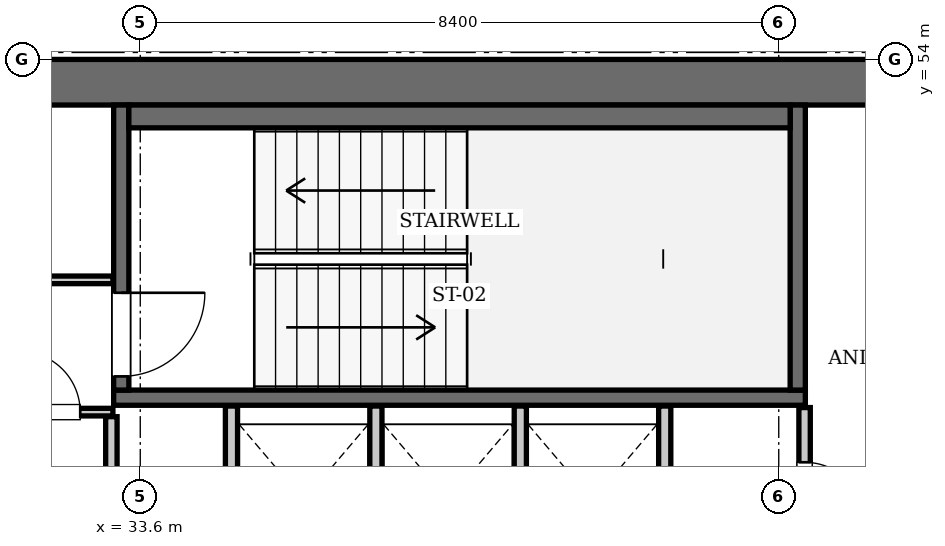
"""IFC4 building model, lengths in metres.
Left out: names, types, materials, properties, quantities, classifications, styles, units other than length and angle.
Written with IfcOpenShell. Run it as: python <this file> out.ifc"""

import sys

from ifc_helpers import new_model, si_unit, direction, frame, frame_2d, origin, place, context, subcontext, project, spatial, rectangle, extrude, element, fill, save


model = new_model("IFC4")
c1 = context("Model", 3, precision=1e-05, world=origin(), true_north=direction((0.0, 1.0)))
c2 = subcontext(c1, "Body", "Model", "MODEL_VIEW")
j1 = project(units=[si_unit("LENGTHUNIT", "METRE"), si_unit("PLANEANGLEUNIT", "RADIAN")], contexts=[c1])
p1 = place(None, origin())
s1 = spatial("IfcSite", under=j1, at=p1, CompositionType="ELEMENT")
p2 = place(p1, origin())
s2 = spatial("IfcBuilding", under=s1, at=p2, CompositionType="ELEMENT")
p3 = place(p2, frame((0.0, 0.0, 325.85)))
s3 = spatial("IfcBuildingStorey", under=s2, at=p3, CompositionType="ELEMENT", Elevation=325.85)
p4 = place(p3, frame((25.2, 53.7, 0.0), z_axis=(0.0, 0.0, 1.0), x_axis=(1.0, 0.0, 0.0)))
e1 = element("IfcWall", 1, at=p4, inside=s3, PredefinedType="SHEAR", context=c2, shape_type="SweptSolid", body=[
    extrude(rectangle(XDim=25.2, YDim=0.6, at=frame_2d((12.6, 0.0))), origin(), (0.0, 0.0, 1.0), 3.85),
])
p5 = place(p3, frame((33.25, 49.55, 0.0), z_axis=(0.0, 0.0, 1.0), x_axis=(1.0, 0.0, 0.0)))
e2 = element("IfcWall", 2, at=p5, inside=s3, PredefinedType="SOLIDWALL", context=c2, shape_type="SweptSolid", body=[
    extrude(rectangle(XDim=9.1, YDim=0.2, at=frame_2d((4.55, 0.0))), origin(), (0.0, 0.0, 1.0), 3.61),
])
p6 = place(p3, frame((42.25, 49.65, 0.0), z_axis=(0.0, 0.0, 1.0), x_axis=(0.0, 1.0, 0.0)))
e3 = element("IfcWall", 3, at=p6, inside=s3, PredefinedType="SOLIDWALL", context=c2, shape_type="SweptSolid", body=[
    extrude(rectangle(XDim=3.75, YDim=0.2, at=frame_2d((1.875, 0.0))), origin(), (0.0, 0.0, 1.0), 3.61),
])
p7 = place(p3, frame((33.35, 49.65, 0.0), z_axis=(0.0, 0.0, 1.0), x_axis=(0.0, 1.0, 0.0)))
e4 = element("IfcWall", 4, at=p7, inside=s3, PredefinedType="SOLIDWALL", context=c2, shape_type="SweptSolid", body=[
    extrude(rectangle(XDim=3.75, YDim=0.2, at=frame_2d((1.875, 0.0))), origin(), (0.0, 0.0, 1.0), 3.61),
])
p8 = place(p7, frame((0.18, 0.0, 0.0)))
e5 = element("IfcOpeningElement", 5, at=p8, cuts=e4, PredefinedType="OPENING", context=c2, shape_type="SweptSolid", body=[
    extrude(rectangle(XDim=1.1, YDim=2.15, at=frame_2d((0.55, 1.075))), frame((0.0, 0.11, 0.0), z_axis=(0.0, -1.0, 0.0), x_axis=(1.0, 0.0, 0.0)), (0.0, 0.0, 1.0), 0.22),
])
p9 = place(p3, frame((33.45, 53.25, 0.0), z_axis=(0.0, 0.0, 1.0), x_axis=(1.0, 0.0, 0.0)))
e6 = element("IfcWall", 6, at=p9, inside=s3, PredefinedType="SOLIDWALL", context=c2, shape_type="SweptSolid", body=[
    extrude(rectangle(XDim=8.7, YDim=0.3, at=frame_2d((4.35, 0.0))), origin(), (0.0, 0.0, 1.0), 3.61),
])
for number, where, z_axis, x_axis in (
    (7, (34.8, 47.25, 0.0), (0.0, 0.0, 1.0), (0.0, 1.0, 0.0)),
    (8, (36.7, 47.25, 0.0), (0.0, 0.0, 1.0), (0.0, 1.0, 0.0)),
    (9, (38.6, 47.25, 0.0), (0.0, 0.0, 1.0), (0.0, 1.0, 0.0)),
    (10, (40.5, 47.25, 0.0), (0.0, 0.0, 1.0), (0.0, 1.0, 0.0)),
):
    element("IfcWall", number, at=place(p3, frame(where, z_axis=z_axis, x_axis=x_axis)), inside=s3, PredefinedType="SOLIDWALL", context=c2, shape_type="SweptSolid", body=[
        extrude(rectangle(XDim=2.19, YDim=0.16, at=frame_2d((1.095, 0.0))), origin(), (0.0, 0.0, 1.0), 3.61),
    ])
p10 = place(p3, frame((33.22, 45.14, 0.0), z_axis=(0.0, 0.0, 1.0), x_axis=(0.0, 1.0, 0.0)))
e11 = element("IfcWall", 11, at=p10, inside=s3, PredefinedType="PARTITIONING", context=c2, shape_type="SweptSolid", body=[
    extrude(rectangle(XDim=4.16, YDim=0.15, at=frame_2d((2.08, 0.0))), origin(), (0.0, 0.0, 1.0), 3.61),
])
p11 = place(p3, frame((30.06, 49.36, 0.0), z_axis=(0.0, 0.0, 1.0), x_axis=(1.0, 0.0, 0.0)))
e12 = element("IfcWall", 12, at=p11, inside=s3, PredefinedType="PARTITIONING", context=c2, shape_type="SweptSolid", body=[
    extrude(rectangle(XDim=3.18, YDim=0.1, at=frame_2d((1.59, 0.0))), origin(), (0.0, 0.0, 1.0), 3.61),
])
p12 = place(p11, frame((1.95, 0.0, 0.0)))
e13 = element("IfcOpeningElement", 13, at=p12, cuts=e12, PredefinedType="OPENING", context=c2, shape_type="SweptSolid", body=[
    extrude(rectangle(XDim=0.8, YDim=2.05, at=frame_2d((0.4, 1.025))), frame((0.0, 0.06, 0.0), z_axis=(0.0, -1.0, 0.0), x_axis=(1.0, 0.0, 0.0)), (0.0, 0.0, 1.0), 0.12),
])
p13 = place(p3, frame((31.82, 51.1, 0.0), z_axis=(0.0, 0.0, 1.0), x_axis=(1.0, 0.0, 0.0)))
e14 = element("IfcWall", 14, at=p13, inside=s3, PredefinedType="PARTITIONING", context=c2, shape_type="SweptSolid", body=[
    extrude(rectangle(XDim=1.42, YDim=0.1, at=frame_2d((0.71, 0.0))), origin(), (0.0, 0.0, 1.0), 3.61),
])
p14 = place(p3, frame((42.34, 47.66, 0.0), z_axis=(0.0, 0.0, 1.0), x_axis=(0.0, 1.0, 0.0)))
e15 = element("IfcWall", 15, at=p14, inside=s3, PredefinedType="PARTITIONING", context=c2, shape_type="SweptSolid", body=[
    extrude(rectangle(XDim=1.76, YDim=0.15, at=frame_2d((0.88, 0.0))), origin(), (0.0, 0.0, 1.0), 3.61),
])
p15 = place(p14, frame((0.24, 0.0, 0.0)))
e16 = element("IfcOpeningElement", 16, at=p15, cuts=e15, PredefinedType="OPENING", context=c2, shape_type="SweptSolid", body=[
    extrude(rectangle(XDim=0.8, YDim=2.05, at=frame_2d((0.4, 1.025))), frame((0.0, 0.085, 0.0), z_axis=(0.0, -1.0, 0.0), x_axis=(1.0, 0.0, 0.0)), (0.0, 0.0, 1.0), 0.17),
])
p16 = place(p8, frame((1.1, 0.0, 0.0), z_axis=(0.0, 0.0, 1.0), x_axis=(-1.0, 0.0, 0.0)))
e17 = element("IfcDoor", 17, at=p16, inside=s3, OperationType="SINGLE_SWING_LEFT", PredefinedType="DOOR", context=c2, shape_type="SweptSolid", body=[
    extrude(rectangle(XDim=1.1, YDim=2.15, at=frame_2d((0.55, 1.075))), frame((0.0, 0.025, 0.0), z_axis=(0.0, -1.0, 0.0), x_axis=(1.0, 0.0, 0.0)), (0.0, 0.0, 1.0), 0.05),
])
fill(e5, e17)
p17 = place(p12, origin())
e18 = element("IfcDoor", 18, at=p17, inside=s3, OperationType="SINGLE_SWING_LEFT", PredefinedType="DOOR", context=c2, shape_type="SweptSolid", body=[
    extrude(rectangle(XDim=0.8, YDim=2.05, at=frame_2d((0.4, 1.025))), frame((0.0, 0.025, 0.0), z_axis=(0.0, -1.0, 0.0), x_axis=(1.0, 0.0, 0.0)), (0.0, 0.0, 1.0), 0.05),
])
fill(e13, e18)
p18 = place(p15, frame((0.8, 0.0, 0.0), z_axis=(0.0, 0.0, 1.0), x_axis=(-1.0, 0.0, 0.0)))
e19 = element("IfcDoor", 19, at=p18, inside=s3, OperationType="SINGLE_SWING_RIGHT", PredefinedType="DOOR", context=c2, shape_type="SweptSolid", body=[
    extrude(rectangle(XDim=0.8, YDim=2.05, at=frame_2d((0.4, 1.025))), frame((0.0, 0.025, 0.0), z_axis=(0.0, -1.0, 0.0), x_axis=(1.0, 0.0, 0.0)), (0.0, 0.0, 1.0), 0.05),
])
fill(e16, e19)
save(model, sys.argv[1])
